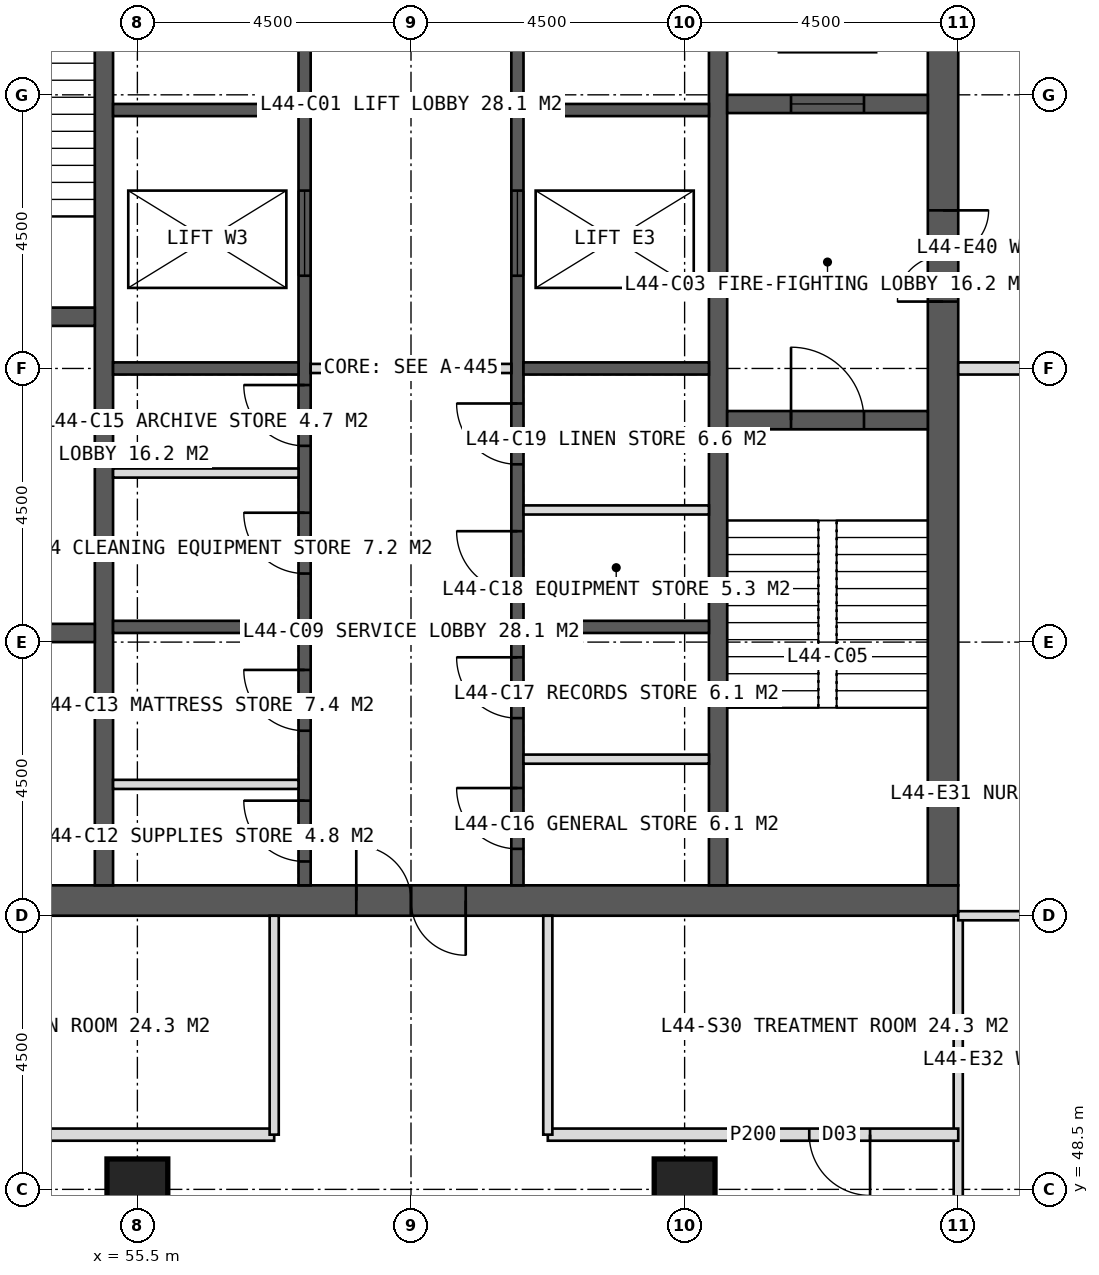
"""IFC4 building model, lengths in metres.
Left out: names, types, materials, properties, quantities, classifications, styles, units other than length and angle.
Written with IfcOpenShell. Run it as: python <this file> out.ifc"""

import sys

from ifc_helpers import new_model, si_unit, direction, frame, frame_2d, origin, origin_2d, place, context, subcontext, project, spatial, rectangle, hollow_rectangle, extrude, element, fill, save


model = new_model("IFC4")
c1 = context("Model", 3, precision=1e-05, world=origin(), true_north=direction((0.0, 1.0)))
c2 = subcontext(c1, "Body", "Model", "MODEL_VIEW")
j1 = project(units=[si_unit("LENGTHUNIT", "METRE"), si_unit("PLANEANGLEUNIT", "RADIAN")], contexts=[c1])
p1 = place(None, origin())
s1 = spatial("IfcSite", under=j1, at=p1, CompositionType="ELEMENT")
p2 = place(p1, origin())
s2 = spatial("IfcBuilding", under=s1, at=p2, CompositionType="ELEMENT")
p3 = place(p2, frame((0.0, 0.0, 185.0)))
s3 = spatial("IfcBuildingStorey", under=s2, at=p3, CompositionType="ELEMENT", Elevation=185.0)
p4 = place(p3, frame((51.0, 53.25, 0.0), z_axis=(0.0, 0.0, 1.0), x_axis=(1.0, 0.0, 0.0)))
e1 = element("IfcWall", 1, at=p4, inside=s3, PredefinedType="SHEAR", context=c2, shape_type="SweptSolid", body=[
    extrude(rectangle(XDim=18.0, YDim=0.5, at=frame_2d((9.0, 0.0))), origin(), (0.0, 0.0, 1.0), 4.0),
])
p5 = place(p4, frame((8.1, 0.0, 0.0)))
e2 = element("IfcOpeningElement", 2, at=p5, cuts=e1, PredefinedType="OPENING", context=c2, shape_type="SweptSolid", body=[
    extrude(rectangle(XDim=1.8, YDim=2.2, at=frame_2d((0.9, 1.1))), frame((0.0, 0.26, 0.0), z_axis=(0.0, -1.0, 0.0), x_axis=(1.0, 0.0, 0.0)), (0.0, 0.0, 1.0), 0.52),
])
p6 = place(p3, frame((68.75, 53.5, 0.0), z_axis=(0.0, 0.0, 1.0), x_axis=(0.0, 1.0, 0.0)))
e3 = element("IfcWall", 3, at=p6, inside=s3, PredefinedType="SHEAR", context=c2, shape_type="SweptSolid", body=[
    extrude(rectangle(XDim=17.0, YDim=0.5, at=frame_2d((8.5, 0.0))), origin(), (0.0, 0.0, 1.0), 4.0),
])
p7 = place(p6, frame((9.6, 0.0, 0.0)))
e4 = element("IfcOpeningElement", 4, at=p7, cuts=e3, PredefinedType="OPENING", context=c2, shape_type="SweptSolid", body=[
    extrude(rectangle(XDim=1.5, YDim=2.2, at=frame_2d((0.75, 1.1))), frame((0.0, 0.26, 0.0), z_axis=(0.0, -1.0, 0.0), x_axis=(1.0, 0.0, 0.0)), (0.0, 0.0, 1.0), 0.52),
])
for number, where, z_axis, x_axis in (
    (5, (54.95, 53.5, 0.0), (0.0, 0.0, 1.0), (0.0, 1.0, 0.0)),
    (6, (65.05, 53.5, 0.0), (0.0, 0.0, 1.0), (0.0, 1.0, 0.0)),
):
    element("IfcWall", number, at=place(p3, frame(where, z_axis=z_axis, x_axis=x_axis)), inside=s3, PredefinedType="SHEAR", context=c2, shape_type="SweptSolid", body=[
        extrude(rectangle(XDim=17.0, YDim=0.3, at=frame_2d((8.5, 0.0))), origin(), (0.0, 0.0, 1.0), 4.0),
    ])
p8 = place(p3, frame((58.25, 53.5, 0.0), z_axis=(0.0, 0.0, 1.0), x_axis=(0.0, 1.0, 0.0)))
e7 = element("IfcWall", 7, at=p8, inside=s3, PredefinedType="SHEAR", context=c2, shape_type="SweptSolid", body=[
    extrude(rectangle(XDim=17.0, YDim=0.2, at=frame_2d((8.5, 0.0))), origin(), (0.0, 0.0, 1.0), 4.0),
])
p9 = place(p8, frame((0.393, 0.0, 0.0)))
e8 = element("IfcOpeningElement", 8, at=p9, cuts=e7, PredefinedType="OPENING", context=c2, shape_type="SweptSolid", body=[
    extrude(rectangle(XDim=1.0, YDim=2.1, at=frame_2d((0.5, 1.05))), frame((0.0, 0.11, 0.0), z_axis=(0.0, -1.0, 0.0), x_axis=(1.0, 0.0, 0.0)), (0.0, 0.0, 1.0), 0.22),
])
p10 = place(p8, frame((2.542, 0.0, 0.0)))
e9 = element("IfcOpeningElement", 9, at=p10, cuts=e7, PredefinedType="OPENING", context=c2, shape_type="SweptSolid", body=[
    extrude(rectangle(XDim=1.0, YDim=2.1, at=frame_2d((0.5, 1.05))), frame((0.0, 0.11, 0.0), z_axis=(0.0, -1.0, 0.0), x_axis=(1.0, 0.0, 0.0)), (0.0, 0.0, 1.0), 0.22),
])
p11 = place(p8, frame((5.127, 0.0, 0.0)))
e10 = element("IfcOpeningElement", 10, at=p11, cuts=e7, PredefinedType="OPENING", context=c2, shape_type="SweptSolid", body=[
    extrude(rectangle(XDim=1.0, YDim=2.1, at=frame_2d((0.5, 1.05))), frame((0.0, 0.11, 0.0), z_axis=(0.0, -1.0, 0.0), x_axis=(1.0, 0.0, 0.0)), (0.0, 0.0, 1.0), 0.22),
])
p12 = place(p8, frame((7.228, 0.0, 0.0)))
e11 = element("IfcOpeningElement", 11, at=p12, cuts=e7, PredefinedType="OPENING", context=c2, shape_type="SweptSolid", body=[
    extrude(rectangle(XDim=1.0, YDim=2.1, at=frame_2d((0.5, 1.05))), frame((0.0, 0.11, 0.0), z_axis=(0.0, -1.0, 0.0), x_axis=(1.0, 0.0, 0.0)), (0.0, 0.0, 1.0), 0.22),
])
p13 = place(p8, frame((10.025, 0.0, 0.0)))
e12 = element("IfcOpeningElement", 12, at=p13, cuts=e7, PredefinedType="OPENING", context=c2, shape_type="SweptSolid", body=[
    extrude(rectangle(XDim=1.4, YDim=2.2, at=frame_2d((0.7, 1.1))), frame((0.0, 0.11, 0.0), z_axis=(0.0, -1.0, 0.0), x_axis=(1.0, 0.0, 0.0)), (0.0, 0.0, 1.0), 0.22),
])
p14 = place(p8, frame((14.325, 0.0, 0.0)))
e13 = element("IfcOpeningElement", 13, at=p14, cuts=e7, PredefinedType="OPENING", context=c2, shape_type="SweptSolid", body=[
    extrude(rectangle(XDim=1.4, YDim=2.2, at=frame_2d((0.7, 1.1))), frame((0.0, 0.11, 0.0), z_axis=(0.0, -1.0, 0.0), x_axis=(1.0, 0.0, 0.0)), (0.0, 0.0, 1.0), 0.22),
])
p15 = place(p3, frame((61.75, 53.5, 0.0), z_axis=(0.0, 0.0, 1.0), x_axis=(0.0, 1.0, 0.0)))
e14 = element("IfcWall", 14, at=p15, inside=s3, PredefinedType="SHEAR", context=c2, shape_type="SweptSolid", body=[
    extrude(rectangle(XDim=17.0, YDim=0.2, at=frame_2d((8.5, 0.0))), origin(), (0.0, 0.0, 1.0), 4.0),
])
p16 = place(p15, frame((0.6, 0.0, 0.0)))
e15 = element("IfcOpeningElement", 15, at=p16, cuts=e14, PredefinedType="OPENING", context=c2, shape_type="SweptSolid", body=[
    extrude(rectangle(XDim=1.0, YDim=2.1, at=frame_2d((0.5, 1.05))), frame((0.0, 0.11, 0.0), z_axis=(0.0, -1.0, 0.0), x_axis=(1.0, 0.0, 0.0)), (0.0, 0.0, 1.0), 0.22),
])
p17 = place(p15, frame((2.75, 0.0, 0.0)))
e16 = element("IfcOpeningElement", 16, at=p17, cuts=e14, PredefinedType="OPENING", context=c2, shape_type="SweptSolid", body=[
    extrude(rectangle(XDim=1.0, YDim=2.1, at=frame_2d((0.5, 1.05))), frame((0.0, 0.11, 0.0), z_axis=(0.0, -1.0, 0.0), x_axis=(1.0, 0.0, 0.0)), (0.0, 0.0, 1.0), 0.22),
])
p18 = place(p15, frame((4.824, 0.0, 0.0)))
e17 = element("IfcOpeningElement", 17, at=p18, cuts=e14, PredefinedType="OPENING", context=c2, shape_type="SweptSolid", body=[
    extrude(rectangle(XDim=1.0, YDim=2.1, at=frame_2d((0.5, 1.05))), frame((0.0, 0.11, 0.0), z_axis=(0.0, -1.0, 0.0), x_axis=(1.0, 0.0, 0.0)), (0.0, 0.0, 1.0), 0.22),
])
p19 = place(p15, frame((6.924, 0.0, 0.0)))
e18 = element("IfcOpeningElement", 18, at=p19, cuts=e14, PredefinedType="OPENING", context=c2, shape_type="SweptSolid", body=[
    extrude(rectangle(XDim=1.0, YDim=2.1, at=frame_2d((0.5, 1.05))), frame((0.0, 0.11, 0.0), z_axis=(0.0, -1.0, 0.0), x_axis=(1.0, 0.0, 0.0)), (0.0, 0.0, 1.0), 0.22),
])
p20 = place(p15, frame((10.025, 0.0, 0.0)))
e19 = element("IfcOpeningElement", 19, at=p20, cuts=e14, PredefinedType="OPENING", context=c2, shape_type="SweptSolid", body=[
    extrude(rectangle(XDim=1.4, YDim=2.2, at=frame_2d((0.7, 1.1))), frame((0.0, 0.11, 0.0), z_axis=(0.0, -1.0, 0.0), x_axis=(1.0, 0.0, 0.0)), (0.0, 0.0, 1.0), 0.22),
])
p21 = place(p15, frame((14.325, 0.0, 0.0)))
e20 = element("IfcOpeningElement", 20, at=p21, cuts=e14, PredefinedType="OPENING", context=c2, shape_type="SweptSolid", body=[
    extrude(rectangle(XDim=1.4, YDim=2.2, at=frame_2d((0.7, 1.1))), frame((0.0, 0.11, 0.0), z_axis=(0.0, -1.0, 0.0), x_axis=(1.0, 0.0, 0.0)), (0.0, 0.0, 1.0), 0.22),
])
for number, where, z_axis, x_axis in (
    (21, (55.1, 57.75, 0.0), (0.0, 0.0, 1.0), (1.0, 0.0, 0.0)),
    (22, (61.85, 57.75, 0.0), (0.0, 0.0, 1.0), (1.0, 0.0, 0.0)),
    (23, (55.1, 62.0, 0.0), (0.0, 0.0, 1.0), (1.0, 0.0, 0.0)),
    (24, (61.85, 62.0, 0.0), (0.0, 0.0, 1.0), (1.0, 0.0, 0.0)),
    (25, (55.1, 66.25, 0.0), (0.0, 0.0, 1.0), (1.0, 0.0, 0.0)),
    (26, (61.85, 66.25, 0.0), (0.0, 0.0, 1.0), (1.0, 0.0, 0.0)),
):
    element("IfcWall", number, at=place(p3, frame(where, z_axis=z_axis, x_axis=x_axis)), inside=s3, PredefinedType="SHEAR", context=c2, shape_type="SweptSolid", body=[
        extrude(rectangle(XDim=3.05, YDim=0.2, at=frame_2d((1.525, 0.0))), origin(), (0.0, 0.0, 1.0), 4.0),
    ])
p22 = place(p3, frame((51.5, 62.85, 0.0), z_axis=(0.0, 0.0, 1.0), x_axis=(1.0, 0.0, 0.0)))
e27 = element("IfcWall", 27, at=p22, inside=s3, PredefinedType="SHEAR", context=c2, shape_type="SweptSolid", body=[
    extrude(rectangle(XDim=3.3, YDim=0.3, at=frame_2d((1.65, 0.0))), origin(), (0.0, 0.0, 1.0), 4.0),
])
p23 = place(p22, frame((1.15, 0.0, 0.0)))
e28 = element("IfcOpeningElement", 28, at=p23, cuts=e27, PredefinedType="OPENING", context=c2, shape_type="SweptSolid", body=[
    extrude(rectangle(XDim=1.2, YDim=2.1, at=frame_2d((0.6, 1.05))), frame((0.0, 0.16, 0.0), z_axis=(0.0, -1.0, 0.0), x_axis=(1.0, 0.0, 0.0)), (0.0, 0.0, 1.0), 0.32),
])
p24 = place(p3, frame((51.5, 57.65, 0.0), z_axis=(0.0, 0.0, 1.0), x_axis=(1.0, 0.0, 0.0)))
e29 = element("IfcWall", 29, at=p24, inside=s3, PredefinedType="SHEAR", context=c2, shape_type="SweptSolid", body=[
    extrude(rectangle(XDim=3.3, YDim=0.3, at=frame_2d((1.65, 0.0))), origin(), (0.0, 0.0, 1.0), 4.0),
])
p25 = place(p24, frame((1.15, 0.0, 0.0)))
e30 = element("IfcOpeningElement", 30, at=p25, cuts=e29, PredefinedType="OPENING", context=c2, shape_type="SweptSolid", body=[
    extrude(rectangle(XDim=1.2, YDim=2.2, at=frame_2d((0.6, 1.1))), frame((0.0, 0.16, 0.0), z_axis=(0.0, -1.0, 0.0), x_axis=(1.0, 0.0, 0.0)), (0.0, 0.0, 1.0), 0.32),
])
p26 = place(p3, frame((65.2, 61.15, 0.0), z_axis=(0.0, 0.0, 1.0), x_axis=(1.0, 0.0, 0.0)))
e31 = element("IfcWall", 31, at=p26, inside=s3, PredefinedType="SHEAR", context=c2, shape_type="SweptSolid", body=[
    extrude(rectangle(XDim=3.3, YDim=0.3, at=frame_2d((1.65, 0.0))), origin(), (0.0, 0.0, 1.0), 4.0),
])
p27 = place(p26, frame((1.05, 0.0, 0.0)))
e32 = element("IfcOpeningElement", 32, at=p27, cuts=e31, PredefinedType="OPENING", context=c2, shape_type="SweptSolid", body=[
    extrude(rectangle(XDim=1.2, YDim=2.1, at=frame_2d((0.6, 1.05))), frame((0.0, 0.16, 0.0), z_axis=(0.0, -1.0, 0.0), x_axis=(1.0, 0.0, 0.0)), (0.0, 0.0, 1.0), 0.32),
])
p28 = place(p3, frame((65.2, 66.35, 0.0), z_axis=(0.0, 0.0, 1.0), x_axis=(1.0, 0.0, 0.0)))
e33 = element("IfcWall", 33, at=p28, inside=s3, PredefinedType="SHEAR", context=c2, shape_type="SweptSolid", body=[
    extrude(rectangle(XDim=3.3, YDim=0.3, at=frame_2d((1.65, 0.0))), origin(), (0.0, 0.0, 1.0), 4.0),
])
p29 = place(p28, frame((1.05, 0.0, 0.0)))
e34 = element("IfcOpeningElement", 34, at=p29, cuts=e33, PredefinedType="OPENING", context=c2, shape_type="SweptSolid", body=[
    extrude(rectangle(XDim=1.2, YDim=2.2, at=frame_2d((0.6, 1.1))), frame((0.0, 0.16, 0.0), z_axis=(0.0, -1.0, 0.0), x_axis=(1.0, 0.0, 0.0)), (0.0, 0.0, 1.0), 0.32),
])
for number, where, z_axis, x_axis in (
    (35, (55.5, 48.5, 0.0), (0.0, 0.0, 1.0), (1.0, 0.0, 0.0)),
    (36, (64.5, 48.5, 0.0), (0.0, 0.0, 1.0), (1.0, 0.0, 0.0)),
):
    element("IfcColumn", number, at=place(p3, frame(where, z_axis=z_axis, x_axis=x_axis)), inside=s3, PredefinedType="COLUMN", context=c2, shape_type="SweptSolid", body=[
        extrude(hollow_rectangle(XDim=1.0, YDim=1.0, WallThickness=0.1, at=origin_2d()), origin(), (0.0, 0.0, 1.0), 4.0),
    ])
p30 = place(p3, frame((69.0, 53.0, 0.0), z_axis=(0.0, 0.0, 1.0), x_axis=(0.0, -1.0, 0.0)))
e37 = element("IfcWall", 37, at=p30, inside=s3, PredefinedType="PARTITIONING", context=c2, shape_type="SweptSolid", body=[
    extrude(rectangle(XDim=5.1, YDim=0.15, at=frame_2d((2.55, 0.0))), origin(), (0.0, 0.0, 1.0), 3.75),
])
p31 = place(p3, frame((69.0, 49.4, 0.0), z_axis=(0.0, 0.0, 1.0), x_axis=(-1.0, 0.0, 0.0)))
e38 = element("IfcWall", 38, at=p31, inside=s3, PredefinedType="PARTITIONING", context=c2, shape_type="SweptSolid", body=[
    extrude(rectangle(XDim=6.75, YDim=0.2, at=frame_2d((3.375, 0.0))), origin(), (0.0, 0.0, 1.0), 3.75),
])
p32 = place(p31, frame((1.45, 0.0, 0.0)))
e39 = element("IfcOpeningElement", 39, at=p32, cuts=e38, PredefinedType="OPENING", context=c2, shape_type="SweptSolid", body=[
    extrude(rectangle(XDim=1.0, YDim=2.1, at=frame_2d((0.5, 1.05))), frame((0.0, 0.11, 0.0), z_axis=(0.0, -1.0, 0.0), x_axis=(1.0, 0.0, 0.0)), (0.0, 0.0, 1.0), 0.22),
])
p33 = place(p3, frame((57.75, 49.4, 0.0), z_axis=(0.0, 0.0, 1.0), x_axis=(-1.0, 0.0, 0.0)))
e40 = element("IfcWall", 40, at=p33, inside=s3, PredefinedType="PARTITIONING", context=c2, shape_type="SweptSolid", body=[
    extrude(rectangle(XDim=11.85, YDim=0.2, at=frame_2d((5.925, 0.0))), origin(), (0.0, 0.0, 1.0), 3.75),
])
p34 = place(p33, frame((4.3, 0.0, 0.0)))
e41 = element("IfcOpeningElement", 41, at=p34, cuts=e40, PredefinedType="OPENING", context=c2, shape_type="SweptSolid", body=[
    extrude(rectangle(XDim=1.0, YDim=2.1, at=frame_2d((0.5, 1.05))), frame((0.0, 0.11, 0.0), z_axis=(0.0, -1.0, 0.0), x_axis=(1.0, 0.0, 0.0)), (0.0, 0.0, 1.0), 0.22),
])
p35 = place(p33, frame((8.8, 0.0, 0.0)))
e42 = element("IfcOpeningElement", 42, at=p35, cuts=e40, PredefinedType="OPENING", context=c2, shape_type="SweptSolid", body=[
    extrude(rectangle(XDim=1.0, YDim=2.1, at=frame_2d((0.5, 1.05))), frame((0.0, 0.11, 0.0), z_axis=(0.0, -1.0, 0.0), x_axis=(1.0, 0.0, 0.0)), (0.0, 0.0, 1.0), 0.22),
])
for number, where, z_axis, x_axis in (
    (43, (62.25, 53.0, 0.0), (0.0, 0.0, 1.0), (0.0, -1.0, 0.0)),
    (44, (57.75, 53.0, 0.0), (0.0, 0.0, 1.0), (0.0, -1.0, 0.0)),
):
    element("IfcWall", number, at=place(p3, frame(where, z_axis=z_axis, x_axis=x_axis)), inside=s3, PredefinedType="PARTITIONING", context=c2, shape_type="SweptSolid", body=[
        extrude(rectangle(XDim=3.6, YDim=0.15, at=frame_2d((1.8, 0.0))), origin(), (0.0, 0.0, 1.0), 3.75),
    ])
p36 = place(p3, frame((69.0, 62.0, 0.0), z_axis=(0.0, 0.0, 1.0), x_axis=(1.0, 0.0, 0.0)))
e45 = element("IfcWall", 45, at=p36, inside=s3, PredefinedType="SOLIDWALL", context=c2, shape_type="SweptSolid", body=[
    extrude(rectangle(XDim=5.1, YDim=0.2, at=frame_2d((2.55, 0.0))), origin(), (0.0, 0.0, 1.0), 2.95),
])
p37 = place(p3, frame((69.0, 53.0, 0.0), z_axis=(0.0, 0.0, 1.0), x_axis=(1.0, 0.0, 0.0)))
e46 = element("IfcWall", 46, at=p37, inside=s3, PredefinedType="PARTITIONING", context=c2, shape_type="SweptSolid", body=[
    extrude(rectangle(XDim=5.1, YDim=0.15, at=frame_2d((2.55, 0.0))), origin(), (0.0, 0.0, 1.0), 3.75),
])
for number, where, z_axis, x_axis in (
    (47, (55.1, 55.16, 0.0), (0.0, 0.0, 1.0), (1.0, 0.0, 0.0)),
    (48, (61.85, 55.575, 0.0), (0.0, 0.0, 1.0), (1.0, 0.0, 0.0)),
    (49, (55.1, 60.28, 0.0), (0.0, 0.0, 1.0), (1.0, 0.0, 0.0)),
    (50, (61.85, 59.673, 0.0), (0.0, 0.0, 1.0), (1.0, 0.0, 0.0)),
):
    element("IfcWall", number, at=place(p3, frame(where, z_axis=z_axis, x_axis=x_axis)), inside=s3, PredefinedType="PARTITIONING", context=c2, shape_type="SweptSolid", body=[
        extrude(rectangle(XDim=3.05, YDim=0.15, at=frame_2d((1.525, 0.0))), origin(), (0.0, 0.0, 1.0), 3.75),
    ])
p38 = place(p3, frame((58.35, 62.0, 0.0), z_axis=(0.0, 0.0, 1.0), x_axis=(1.0, 0.0, 0.0)))
e51 = element("IfcWall", 51, at=p38, inside=s3, PredefinedType="PARTITIONING", context=c2, shape_type="SweptSolid", body=[
    extrude(rectangle(XDim=3.3, YDim=0.15, at=frame_2d((1.65, 0.0))), origin(), (0.0, 0.0, 1.0), 3.75),
])
p39 = place(p32, origin())
e52 = element("IfcDoor", 52, at=p39, inside=s3, OperationType="SINGLE_SWING_LEFT", PredefinedType="DOOR", context=c2, shape_type="SweptSolid", body=[
    extrude(rectangle(XDim=1.0, YDim=2.1, at=frame_2d((0.5, 1.05))), frame((0.0, 0.025, 0.0), z_axis=(0.0, -1.0, 0.0), x_axis=(1.0, 0.0, 0.0)), (0.0, 0.0, 1.0), 0.05),
])
fill(e39, e52)
p40 = place(p7, origin())
e53 = element("IfcDoor", 53, at=p40, inside=s3, OperationType="DOUBLE_DOOR_SINGLE_SWING", PredefinedType="DOOR", context=c2, shape_type="SweptSolid", body=[
    extrude(rectangle(XDim=1.5, YDim=2.2, at=frame_2d((0.75, 1.1))), frame((0.0, 0.025, 0.0), z_axis=(0.0, -1.0, 0.0), x_axis=(1.0, 0.0, 0.0)), (0.0, 0.0, 1.0), 0.05),
])
fill(e4, e53)
p41 = place(p27, origin())
e54 = element("IfcDoor", 54, at=p41, inside=s3, OperationType="SINGLE_SWING_LEFT", PredefinedType="DOOR", context=c2, shape_type="SweptSolid", body=[
    extrude(rectangle(XDim=1.2, YDim=2.1, at=frame_2d((0.6, 1.05))), frame((0.0, 0.025, 0.0), z_axis=(0.0, -1.0, 0.0), x_axis=(1.0, 0.0, 0.0)), (0.0, 0.0, 1.0), 0.05),
])
fill(e32, e54)
p42 = place(p29, origin())
e55 = element("IfcDoor", 55, at=p42, inside=s3, OperationType="SLIDING_TO_LEFT", PredefinedType="DOOR", context=c2, shape_type="SweptSolid", body=[
    extrude(rectangle(XDim=1.2, YDim=2.2, at=frame_2d((0.6, 1.1))), frame((0.0, 0.025, 0.0), z_axis=(0.0, -1.0, 0.0), x_axis=(1.0, 0.0, 0.0)), (0.0, 0.0, 1.0), 0.05),
])
fill(e34, e55)
p43 = place(p9, origin())
e56 = element("IfcDoor", 56, at=p43, inside=s3, OperationType="SINGLE_SWING_RIGHT", PredefinedType="DOOR", context=c2, shape_type="SweptSolid", body=[
    extrude(rectangle(XDim=1.0, YDim=2.1, at=frame_2d((0.5, 1.05))), frame((0.0, 0.025, 0.0), z_axis=(0.0, -1.0, 0.0), x_axis=(1.0, 0.0, 0.0)), (0.0, 0.0, 1.0), 0.05),
])
fill(e8, e56)
p44 = place(p10, origin())
e57 = element("IfcDoor", 57, at=p44, inside=s3, OperationType="SINGLE_SWING_RIGHT", PredefinedType="DOOR", context=c2, shape_type="SweptSolid", body=[
    extrude(rectangle(XDim=1.0, YDim=2.1, at=frame_2d((0.5, 1.05))), frame((0.0, 0.025, 0.0), z_axis=(0.0, -1.0, 0.0), x_axis=(1.0, 0.0, 0.0)), (0.0, 0.0, 1.0), 0.05),
])
fill(e9, e57)
p45 = place(p16, origin())
e58 = element("IfcDoor", 58, at=p45, inside=s3, OperationType="SINGLE_SWING_RIGHT", PredefinedType="DOOR", context=c2, shape_type="SweptSolid", body=[
    extrude(rectangle(XDim=1.0, YDim=2.1, at=frame_2d((0.5, 1.05))), frame((0.0, 0.025, 0.0), z_axis=(0.0, -1.0, 0.0), x_axis=(1.0, 0.0, 0.0)), (0.0, 0.0, 1.0), 0.05),
])
fill(e15, e58)
p46 = place(p17, origin())
e59 = element("IfcDoor", 59, at=p46, inside=s3, OperationType="SINGLE_SWING_RIGHT", PredefinedType="DOOR", context=c2, shape_type="SweptSolid", body=[
    extrude(rectangle(XDim=1.0, YDim=2.1, at=frame_2d((0.5, 1.05))), frame((0.0, 0.025, 0.0), z_axis=(0.0, -1.0, 0.0), x_axis=(1.0, 0.0, 0.0)), (0.0, 0.0, 1.0), 0.05),
])
fill(e16, e59)
p47 = place(p11, origin())
e60 = element("IfcDoor", 60, at=p47, inside=s3, OperationType="SINGLE_SWING_RIGHT", PredefinedType="DOOR", context=c2, shape_type="SweptSolid", body=[
    extrude(rectangle(XDim=1.0, YDim=2.1, at=frame_2d((0.5, 1.05))), frame((0.0, 0.025, 0.0), z_axis=(0.0, -1.0, 0.0), x_axis=(1.0, 0.0, 0.0)), (0.0, 0.0, 1.0), 0.05),
])
fill(e10, e60)
p48 = place(p12, origin())
e61 = element("IfcDoor", 61, at=p48, inside=s3, OperationType="SINGLE_SWING_RIGHT", PredefinedType="DOOR", context=c2, shape_type="SweptSolid", body=[
    extrude(rectangle(XDim=1.0, YDim=2.1, at=frame_2d((0.5, 1.05))), frame((0.0, 0.025, 0.0), z_axis=(0.0, -1.0, 0.0), x_axis=(1.0, 0.0, 0.0)), (0.0, 0.0, 1.0), 0.05),
])
fill(e11, e61)
p49 = place(p18, origin())
e62 = element("IfcDoor", 62, at=p49, inside=s3, OperationType="SINGLE_SWING_RIGHT", PredefinedType="DOOR", context=c2, shape_type="SweptSolid", body=[
    extrude(rectangle(XDim=1.0, YDim=2.1, at=frame_2d((0.5, 1.05))), frame((0.0, 0.025, 0.0), z_axis=(0.0, -1.0, 0.0), x_axis=(1.0, 0.0, 0.0)), (0.0, 0.0, 1.0), 0.05),
])
fill(e17, e62)
p50 = place(p19, origin())
e63 = element("IfcDoor", 63, at=p50, inside=s3, OperationType="SINGLE_SWING_RIGHT", PredefinedType="DOOR", context=c2, shape_type="SweptSolid", body=[
    extrude(rectangle(XDim=1.0, YDim=2.1, at=frame_2d((0.5, 1.05))), frame((0.0, 0.025, 0.0), z_axis=(0.0, -1.0, 0.0), x_axis=(1.0, 0.0, 0.0)), (0.0, 0.0, 1.0), 0.05),
])
fill(e18, e63)
p51 = place(p13, origin())
e64 = element("IfcDoor", 64, at=p51, inside=s3, OperationType="SLIDING_TO_LEFT", PredefinedType="DOOR", context=c2, shape_type="SweptSolid", body=[
    extrude(rectangle(XDim=1.4, YDim=2.2, at=frame_2d((0.7, 1.1))), frame((0.0, 0.025, 0.0), z_axis=(0.0, -1.0, 0.0), x_axis=(1.0, 0.0, 0.0)), (0.0, 0.0, 1.0), 0.05),
])
fill(e12, e64)
p52 = place(p20, origin())
e65 = element("IfcDoor", 65, at=p52, inside=s3, OperationType="SLIDING_TO_LEFT", PredefinedType="DOOR", context=c2, shape_type="SweptSolid", body=[
    extrude(rectangle(XDim=1.4, YDim=2.2, at=frame_2d((0.7, 1.1))), frame((0.0, 0.025, 0.0), z_axis=(0.0, -1.0, 0.0), x_axis=(1.0, 0.0, 0.0)), (0.0, 0.0, 1.0), 0.05),
])
fill(e19, e65)
p53 = place(p5, origin())
e66 = element("IfcDoor", 66, at=p53, inside=s3, OperationType="DOUBLE_DOOR_SINGLE_SWING", PredefinedType="DOOR", context=c2, shape_type="SweptSolid", body=[
    extrude(rectangle(XDim=1.8, YDim=2.2, at=frame_2d((0.9, 1.1))), frame((0.0, 0.025, 0.0), z_axis=(0.0, -1.0, 0.0), x_axis=(1.0, 0.0, 0.0)), (0.0, 0.0, 1.0), 0.05),
])
fill(e2, e66)
save(model, sys.argv[1])
